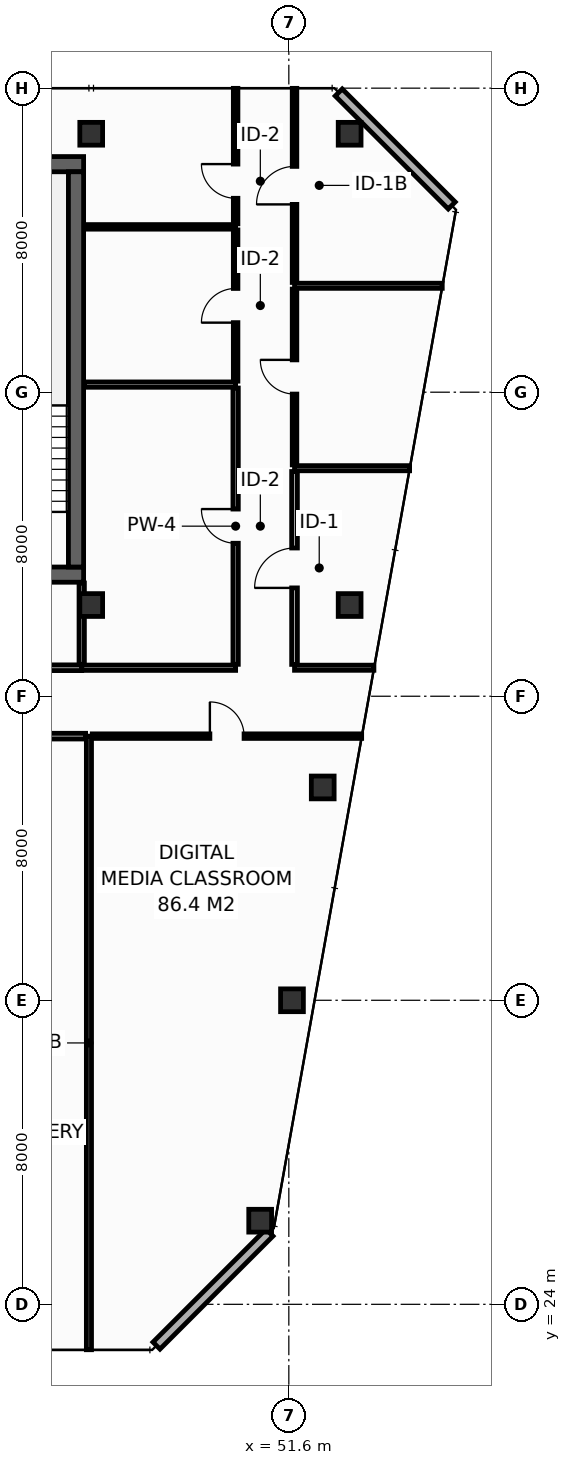
"""IFC4 building model, lengths in metres.
Left out: names, types, materials, properties, quantities, classifications, styles, units other than length and angle.
Written with IfcOpenShell. Run it as: python <this file> out.ifc"""

import sys

from ifc_helpers import new_model, si_unit, direction, frame, frame_2d, origin, origin_2d, place, context, subcontext, project, spatial, rectangle, hollow_rectangle, extrude, element, fill, save


model = new_model("IFC4")
c1 = context("Model", 3, precision=1e-05, world=origin(), true_north=direction((0.0, 1.0)))
c2 = subcontext(c1, "Body", "Model", "MODEL_VIEW")
j1 = project(units=[si_unit("LENGTHUNIT", "METRE"), si_unit("PLANEANGLEUNIT", "RADIAN")], contexts=[c1])
p1 = place(None, origin())
s1 = spatial("IfcSite", under=j1, at=p1, CompositionType="ELEMENT")
p2 = place(p1, origin())
s2 = spatial("IfcBuilding", under=s1, at=p2, CompositionType="ELEMENT")
p3 = place(p2, frame((0.0, 0.0, 268.6)))
s3 = spatial("IfcBuildingStorey", under=s2, at=p3, CompositionType="ELEMENT", Elevation=268.6)
p4 = place(p3, frame((13.7, 43.2, 0.0), z_axis=(0.0, 0.0, 1.0), x_axis=(1.0, 0.0, 0.0)))
e1 = element("IfcWall", 1, at=p4, inside=s3, PredefinedType="SHEAR", context=c2, shape_type="SweptSolid", body=[
    extrude(rectangle(XDim=32.5, YDim=0.4, at=frame_2d((16.25, 0.0))), origin(), (0.0, 0.0, 1.0), 3.55),
])
p5 = place(p4, frame((5.4, 0.0, 0.0)))
e2 = element("IfcOpeningElement", 2, at=p5, cuts=e1, PredefinedType="OPENING", context=c2, shape_type="SweptSolid", body=[
    extrude(rectangle(XDim=1.1, YDim=2.15, at=frame_2d((0.55, 1.075))), frame((0.0, 0.21, 0.0), z_axis=(0.0, -1.0, 0.0), x_axis=(1.0, 0.0, 0.0)), (0.0, 0.0, 1.0), 0.42),
])
p6 = place(p4, frame((25.6, 0.0, 0.0)))
e3 = element("IfcOpeningElement", 3, at=p6, cuts=e1, PredefinedType="OPENING", context=c2, shape_type="SweptSolid", body=[
    extrude(rectangle(XDim=1.1, YDim=2.15, at=frame_2d((0.55, 1.075))), frame((0.0, 0.21, 0.0), z_axis=(0.0, -1.0, 0.0), x_axis=(1.0, 0.0, 0.0)), (0.0, 0.0, 1.0), 0.42),
])
p7 = place(p3, frame((13.7, 54.0, 0.0), z_axis=(0.0, 0.0, 1.0), x_axis=(1.0, 0.0, 0.0)))
e4 = element("IfcWall", 4, at=p7, inside=s3, PredefinedType="SHEAR", context=c2, shape_type="SweptSolid", body=[
    extrude(rectangle(XDim=32.5, YDim=0.4, at=frame_2d((16.25, 0.0))), origin(), (0.0, 0.0, 1.0), 3.55),
])
p8 = place(p3, frame((46.0, 43.4, 0.0), z_axis=(0.0, 0.0, 1.0), x_axis=(0.0, 1.0, 0.0)))
e5 = element("IfcWall", 5, at=p8, inside=s3, PredefinedType="SHEAR", context=c2, shape_type="SweptSolid", body=[
    extrude(rectangle(XDim=10.4, YDim=0.4, at=frame_2d((5.2, 0.0))), origin(), (0.0, 0.0, 1.0), 3.55),
])
for number, where, z_axis, x_axis in (
    (6, (46.4, 54.8, 0.0), (0.0, 0.0, 1.0), (1.0, 0.0, 0.0)),
    (7, (53.2, 54.8, 0.0), (0.0, 0.0, 1.0), (1.0, 0.0, 0.0)),
    (8, (46.4, 42.4, 0.0), (0.0, 0.0, 1.0), (1.0, 0.0, 0.0)),
    (9, (53.2, 42.4, 0.0), (0.0, 0.0, 1.0), (1.0, 0.0, 0.0)),
    (10, (50.846, 26.2, 0.0), (0.0, 0.0, 1.0), (1.0, 0.0, 0.0)),
    (11, (51.683, 32.0, 0.0), (0.0, 0.0, 1.0), (1.0, 0.0, 0.0)),
    (12, (52.492, 37.6, 0.0), (0.0, 0.0, 1.0), (1.0, 0.0, 0.0)),
):
    element("IfcColumn", number, at=place(p3, frame(where, z_axis=z_axis, x_axis=x_axis)), inside=s3, PredefinedType="COLUMN", context=c2, shape_type="SweptSolid", body=[
        extrude(hollow_rectangle(XDim=0.6, YDim=0.6, WallThickness=0.028, at=origin_2d()), origin(), (0.0, 0.0, 1.0), 3.8),
    ])
for number, where, z_axis, x_axis in (
    (13, (48.117, 22.913, 0.0), (0.0, 0.0, 1.0), (0.707, 0.707, 0.0)),
    (14, (55.887, 52.913, 0.0), (0.0, 0.0, 1.0), (-0.707, 0.707, 0.0)),
):
    element("IfcWall", number, at=place(p3, frame(where, z_axis=z_axis, x_axis=x_axis)), inside=s3, PredefinedType="STANDARD", context=c2, shape_type="SweptSolid", body=[
        extrude(rectangle(XDim=4.206, YDim=0.26, at=frame_2d((2.103, 0.0))), origin(), (0.0, 0.0, 1.0), 3.55),
    ])
p9 = place(p3, frame((46.15, 40.75, 0.0), z_axis=(0.0, 0.0, 1.0), x_axis=(1.0, 0.0, 0.0)))
e15 = element("IfcWall", 15, at=p9, inside=s3, PredefinedType="PARTITIONING", context=c2, shape_type="SweptSolid", body=[
    extrude(rectangle(XDim=4.05, YDim=0.14, at=frame_2d((2.025, 0.0))), origin(), (0.0, 0.0, 1.0), 3.55),
])
p10 = place(p3, frame((46.15, 40.84, 0.0), z_axis=(0.0, 0.0, 1.0), x_axis=(0.0, 1.0, 0.0)))
e16 = element("IfcWall", 16, at=p10, inside=s3, PredefinedType="PARTITIONING", context=c2, shape_type="SweptSolid", body=[
    extrude(rectangle(XDim=2.14, YDim=0.14, at=frame_2d((1.07, 0.0))), origin(), (0.0, 0.0, 1.0), 3.55),
])
p11 = place(p3, frame((46.22, 48.2, 0.0), z_axis=(0.0, 0.0, 1.0), x_axis=(1.0, 0.0, 0.0)))
e17 = element("IfcWall", 17, at=p11, inside=s3, PredefinedType="PARTITIONING", context=c2, shape_type="SweptSolid", body=[
    extrude(rectangle(XDim=3.98, YDim=0.14, at=frame_2d((1.99, 0.0))), origin(), (0.0, 0.0, 1.0), 3.55),
])
p12 = place(p3, frame((50.2, 40.84, 0.0), z_axis=(0.0, 0.0, 1.0), x_axis=(0.0, 1.0, 0.0)))
e18 = element("IfcWall", 18, at=p12, inside=s3, PredefinedType="PARTITIONING", context=c2, shape_type="SweptSolid", body=[
    extrude(rectangle(XDim=7.27, YDim=0.14, at=frame_2d((3.635, 0.0))), origin(), (0.0, 0.0, 1.0), 2.947),
])
p13 = place(p12, frame((3.185, 0.0, 0.0)))
e19 = element("IfcOpeningElement", 19, at=p13, cuts=e18, PredefinedType="OPENING", context=c2, shape_type="SweptSolid", body=[
    extrude(rectangle(XDim=0.9, YDim=2.1, at=frame_2d((0.45, 1.05))), frame((0.0, 0.08, 0.0), z_axis=(0.0, -1.0, 0.0), x_axis=(1.0, 0.0, 0.0)), (0.0, 0.0, 1.0), 0.16),
])
p14 = place(p3, frame((46.22, 52.35, 0.0), z_axis=(0.0, 0.0, 1.0), x_axis=(1.0, 0.0, 0.0)))
e20 = element("IfcWall", 20, at=p14, inside=s3, PredefinedType="PARTITIONING", context=c2, shape_type="SweptSolid", body=[
    extrude(rectangle(XDim=3.98, YDim=0.12, at=frame_2d((1.99, 0.0))), origin(), (0.0, 0.0, 1.0), 3.55),
])
p15 = place(p3, frame((50.2, 48.29, 0.0), z_axis=(0.0, 0.0, 1.0), x_axis=(0.0, 1.0, 0.0)))
e21 = element("IfcWall", 21, at=p15, inside=s3, PredefinedType="PARTITIONING", context=c2, shape_type="SweptSolid", body=[
    extrude(rectangle(XDim=3.98, YDim=0.12, at=frame_2d((1.99, 0.0))), origin(), (0.0, 0.0, 1.0), 3.55),
])
p16 = place(p15, frame((1.54, 0.0, 0.0)))
e22 = element("IfcOpeningElement", 22, at=p16, cuts=e21, PredefinedType="OPENING", context=c2, shape_type="SweptSolid", body=[
    extrude(rectangle(XDim=0.9, YDim=2.1, at=frame_2d((0.45, 1.05))), frame((0.0, 0.07, 0.0), z_axis=(0.0, -1.0, 0.0), x_axis=(1.0, 0.0, 0.0)), (0.0, 0.0, 1.0), 0.14),
])
p17 = place(p3, frame((50.2, 52.43, 0.0), z_axis=(0.0, 0.0, 1.0), x_axis=(0.0, 1.0, 0.0)))
e23 = element("IfcWall", 23, at=p17, inside=s3, PredefinedType="PARTITIONING", context=c2, shape_type="SweptSolid", body=[
    extrude(rectangle(XDim=3.565, YDim=0.12, at=frame_2d((1.783, 0.0))), origin(), (0.0, 0.0, 1.0), 2.935),
])
p18 = place(p17, frame((0.672, 0.0, 0.0)))
e24 = element("IfcOpeningElement", 24, at=p18, cuts=e23, PredefinedType="OPENING", context=c2, shape_type="SweptSolid", body=[
    extrude(rectangle(XDim=0.9, YDim=2.1, at=frame_2d((0.45, 1.05))), frame((0.0, 0.07, 0.0), z_axis=(0.0, -1.0, 0.0), x_axis=(1.0, 0.0, 0.0)), (0.0, 0.0, 1.0), 0.14),
])
p19 = place(p3, frame((51.75, 40.75, 0.0), z_axis=(0.0, 0.0, 1.0), x_axis=(1.0, 0.0, 0.0)))
e25 = element("IfcWall", 25, at=p19, inside=s3, PredefinedType="PARTITIONING", context=c2, shape_type="SweptSolid", body=[
    extrude(rectangle(XDim=2.089, YDim=0.135, at=frame_2d((1.044, 0.0))), origin(), (0.0, 0.0, 1.0), 3.085),
])
p20 = place(p3, frame((51.75, 46.0, 0.0), z_axis=(0.0, 0.0, 1.0), x_axis=(1.0, 0.0, 0.0)))
e26 = element("IfcWall", 26, at=p20, inside=s3, PredefinedType="PARTITIONING", context=c2, shape_type="SweptSolid", body=[
    extrude(rectangle(XDim=3.028, YDim=0.135, at=frame_2d((1.514, 0.0))), origin(), (0.0, 0.0, 1.0), 2.947),
])
p21 = place(p3, frame((51.75, 50.8, 0.0), z_axis=(0.0, 0.0, 1.0), x_axis=(1.0, 0.0, 0.0)))
e27 = element("IfcWall", 27, at=p21, inside=s3, PredefinedType="PARTITIONING", context=c2, shape_type="SweptSolid", body=[
    extrude(rectangle(XDim=3.887, YDim=0.135, at=frame_2d((1.943, 0.0))), origin(), (0.0, 0.0, 1.0), 2.947),
])
p22 = place(p3, frame((51.75, 40.837, 0.0), z_axis=(0.0, 0.0, 1.0), x_axis=(0.0, 1.0, 0.0)))
e28 = element("IfcWall", 28, at=p22, inside=s3, PredefinedType="PARTITIONING", context=c2, shape_type="SweptSolid", body=[
    extrude(rectangle(XDim=5.075, YDim=0.15, at=frame_2d((2.538, 0.0))), origin(), (0.0, 0.0, 1.0), 2.947),
])
p23 = place(p22, frame((2.013, 0.0, 0.0)))
e29 = element("IfcOpeningElement", 29, at=p23, cuts=e28, PredefinedType="OPENING", context=c2, shape_type="SweptSolid", body=[
    extrude(rectangle(XDim=1.05, YDim=2.15, at=frame_2d((0.525, 1.075))), frame((0.0, 0.085, 0.0), z_axis=(0.0, -1.0, 0.0), x_axis=(1.0, 0.0, 0.0)), (0.0, 0.0, 1.0), 0.17),
])
p24 = place(p3, frame((51.75, 46.087, 0.0), z_axis=(0.0, 0.0, 1.0), x_axis=(0.0, 1.0, 0.0)))
e30 = element("IfcWall", 30, at=p24, inside=s3, PredefinedType="PARTITIONING", context=c2, shape_type="SweptSolid", body=[
    extrude(rectangle(XDim=4.625, YDim=0.12, at=frame_2d((2.312, 0.0))), origin(), (0.0, 0.0, 1.0), 3.55),
])
p25 = place(p24, frame((1.863, 0.0, 0.0)))
e31 = element("IfcOpeningElement", 31, at=p25, cuts=e30, PredefinedType="OPENING", context=c2, shape_type="SweptSolid", body=[
    extrude(rectangle(XDim=0.9, YDim=2.1, at=frame_2d((0.45, 1.05))), frame((0.0, 0.07, 0.0), z_axis=(0.0, -1.0, 0.0), x_axis=(1.0, 0.0, 0.0)), (0.0, 0.0, 1.0), 0.14),
])
p26 = place(p3, frame((51.75, 50.887, 0.0), z_axis=(0.0, 0.0, 1.0), x_axis=(0.0, 1.0, 0.0)))
e32 = element("IfcWall", 32, at=p26, inside=s3, PredefinedType="PARTITIONING", context=c2, shape_type="SweptSolid", body=[
    extrude(rectangle(XDim=5.108, YDim=0.12, at=frame_2d((2.554, 0.0))), origin(), (0.0, 0.0, 1.0), 2.935),
])
p27 = place(p26, frame((2.054, 0.0, 0.0)))
e33 = element("IfcOpeningElement", 33, at=p27, cuts=e32, PredefinedType="OPENING", context=c2, shape_type="SweptSolid", body=[
    extrude(rectangle(XDim=1.0, YDim=2.15, at=frame_2d((0.5, 1.075))), frame((0.0, 0.07, 0.0), z_axis=(0.0, -1.0, 0.0), x_axis=(1.0, 0.0, 0.0)), (0.0, 0.0, 1.0), 0.14),
])
p28 = place(p3, frame((40.995, 40.75, 0.0), z_axis=(0.0, 0.0, 1.0), x_axis=(1.0, 0.0, 0.0)))
e34 = element("IfcWall", 34, at=p28, inside=s3, PredefinedType="PARTITIONING", context=c2, shape_type="SweptSolid", body=[
    extrude(rectangle(XDim=5.155, YDim=0.15, at=frame_2d((2.577, 0.0))), origin(), (0.0, 0.0, 1.0), 3.55),
])
p29 = place(p28, frame((2.053, 0.0, 0.0)))
e35 = element("IfcOpeningElement", 35, at=p29, cuts=e34, PredefinedType="OPENING", context=c2, shape_type="SweptSolid", body=[
    extrude(rectangle(XDim=1.05, YDim=2.15, at=frame_2d((0.525, 1.075))), frame((0.0, 0.085, 0.0), z_axis=(0.0, -1.0, 0.0), x_axis=(1.0, 0.0, 0.0)), (0.0, 0.0, 1.0), 0.17),
])
p30 = place(p3, frame((46.34, 22.805, 0.0), z_axis=(0.0, 0.0, 1.0), x_axis=(0.0, 1.0, 0.0)))
e36 = element("IfcWall", 36, at=p30, inside=s3, PredefinedType="PARTITIONING", context=c2, shape_type="SweptSolid", body=[
    extrude(rectangle(XDim=16.145, YDim=0.135, at=frame_2d((8.073, 0.0))), origin(), (0.0, 0.0, 1.0), 2.947),
])
p31 = place(p3, frame((37.08, 38.95, 0.0), z_axis=(0.0, 0.0, 1.0), x_axis=(1.0, 0.0, 0.0)))
e37 = element("IfcWall", 37, at=p31, inside=s3, PredefinedType="PARTITIONING", context=c2, shape_type="SweptSolid", body=[
    extrude(rectangle(XDim=9.172, YDim=0.15, at=frame_2d((4.586, 0.0))), origin(), (0.0, 0.0, 1.0), 2.947),
])
p32 = place(p31, frame((4.501, 0.0, 0.0)))
e38 = element("IfcOpeningElement", 38, at=p32, cuts=e37, PredefinedType="OPENING", context=c2, shape_type="SweptSolid", body=[
    extrude(rectangle(XDim=1.05, YDim=2.15, at=frame_2d((0.525, 1.075))), frame((0.0, 0.085, 0.0), z_axis=(0.0, -1.0, 0.0), x_axis=(1.0, 0.0, 0.0)), (0.0, 0.0, 1.0), 0.17),
])
p33 = place(p3, frame((46.427, 38.95, 0.0), z_axis=(0.0, 0.0, 1.0), x_axis=(1.0, 0.0, 0.0)))
e39 = element("IfcWall", 39, at=p33, inside=s3, PredefinedType="PARTITIONING", context=c2, shape_type="SweptSolid", body=[
    extrude(rectangle(XDim=7.089, YDim=0.12, at=frame_2d((3.544, 0.0))), origin(), (0.0, 0.0, 1.0), 3.085),
])
p34 = place(p33, frame((3.095, 0.0, 0.0)))
e40 = element("IfcOpeningElement", 40, at=p34, cuts=e39, PredefinedType="OPENING", context=c2, shape_type="SweptSolid", body=[
    extrude(rectangle(XDim=0.9, YDim=2.1, at=frame_2d((0.45, 1.05))), frame((0.0, 0.07, 0.0), z_axis=(0.0, -1.0, 0.0), x_axis=(1.0, 0.0, 0.0)), (0.0, 0.0, 1.0), 0.14),
])
p35 = place(p13, origin())
e41 = element("IfcDoor", 41, at=p35, inside=s3, OperationType="SINGLE_SWING_RIGHT", PredefinedType="DOOR", context=c2, shape_type="SweptSolid", body=[
    extrude(rectangle(XDim=0.9, YDim=2.1, at=frame_2d((0.45, 1.05))), frame((0.0, 0.025, 0.0), z_axis=(0.0, -1.0, 0.0), x_axis=(1.0, 0.0, 0.0)), (0.0, 0.0, 1.0), 0.05),
])
fill(e19, e41)
p36 = place(p16, origin())
e42 = element("IfcDoor", 42, at=p36, inside=s3, OperationType="SINGLE_SWING_LEFT", PredefinedType="DOOR", context=c2, shape_type="SweptSolid", body=[
    extrude(rectangle(XDim=0.9, YDim=2.1, at=frame_2d((0.45, 1.05))), frame((0.0, 0.025, 0.0), z_axis=(0.0, -1.0, 0.0), x_axis=(1.0, 0.0, 0.0)), (0.0, 0.0, 1.0), 0.05),
])
fill(e22, e42)
p37 = place(p18, origin())
e43 = element("IfcDoor", 43, at=p37, inside=s3, OperationType="SINGLE_SWING_RIGHT", PredefinedType="DOOR", context=c2, shape_type="SweptSolid", body=[
    extrude(rectangle(XDim=0.9, YDim=2.1, at=frame_2d((0.45, 1.05))), frame((0.0, 0.025, 0.0), z_axis=(0.0, -1.0, 0.0), x_axis=(1.0, 0.0, 0.0)), (0.0, 0.0, 1.0), 0.05),
])
fill(e24, e43)
p38 = place(p23, origin())
e44 = element("IfcDoor", 44, at=p38, inside=s3, OperationType="SINGLE_SWING_LEFT", PredefinedType="DOOR", context=c2, shape_type="SweptSolid", body=[
    extrude(rectangle(XDim=1.05, YDim=2.15, at=frame_2d((0.525, 1.075))), frame((0.0, 0.025, 0.0), z_axis=(0.0, -1.0, 0.0), x_axis=(1.0, 0.0, 0.0)), (0.0, 0.0, 1.0), 0.05),
])
fill(e29, e44)
p39 = place(p25, origin())
e45 = element("IfcDoor", 45, at=p39, inside=s3, OperationType="SINGLE_SWING_RIGHT", PredefinedType="DOOR", context=c2, shape_type="SweptSolid", body=[
    extrude(rectangle(XDim=0.9, YDim=2.1, at=frame_2d((0.45, 1.05))), frame((0.0, 0.025, 0.0), z_axis=(0.0, -1.0, 0.0), x_axis=(1.0, 0.0, 0.0)), (0.0, 0.0, 1.0), 0.05),
])
fill(e31, e45)
p40 = place(p27, origin())
e46 = element("IfcDoor", 46, at=p40, inside=s3, OperationType="SINGLE_SWING_LEFT", PredefinedType="DOOR", context=c2, shape_type="SweptSolid", body=[
    extrude(rectangle(XDim=1.0, YDim=2.15, at=frame_2d((0.5, 1.075))), frame((0.0, 0.025, 0.0), z_axis=(0.0, -1.0, 0.0), x_axis=(1.0, 0.0, 0.0)), (0.0, 0.0, 1.0), 0.05),
])
fill(e33, e46)
p41 = place(p34, origin())
e47 = element("IfcDoor", 47, at=p41, inside=s3, OperationType="SINGLE_SWING_LEFT", PredefinedType="DOOR", context=c2, shape_type="SweptSolid", body=[
    extrude(rectangle(XDim=0.9, YDim=2.1, at=frame_2d((0.45, 1.05))), frame((0.0, 0.025, 0.0), z_axis=(0.0, -1.0, 0.0), x_axis=(1.0, 0.0, 0.0)), (0.0, 0.0, 1.0), 0.05),
])
fill(e40, e47)
save(model, sys.argv[1])
